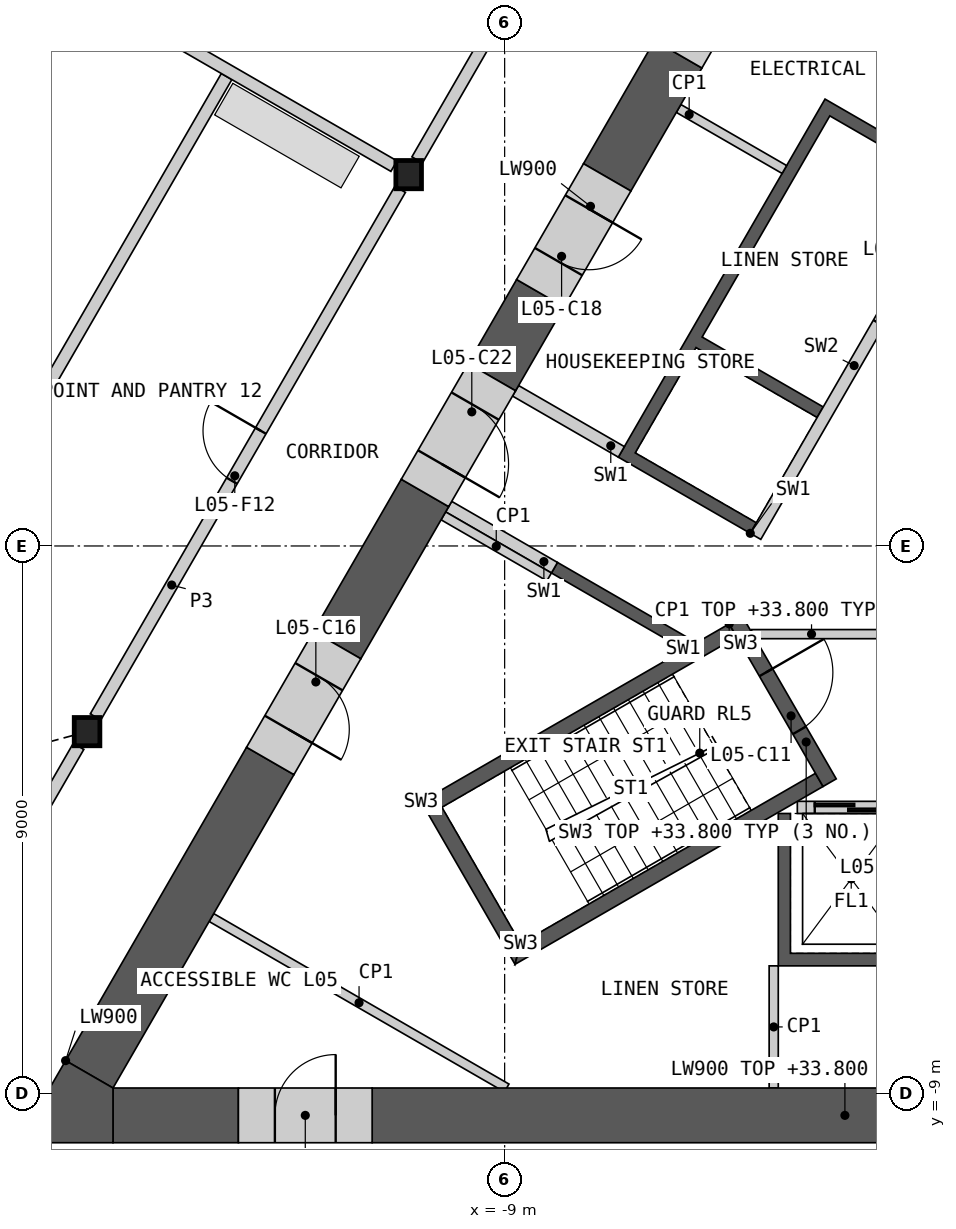
"""IFC4 building model, lengths in metres.
Left out: names, types, materials, properties, quantities, classifications, styles, units other than length and angle.
Written with IfcOpenShell. Run it as: python <this file> out.ifc"""

import sys

from ifc_helpers import new_model, si_unit, direction, frame, frame_2d, origin, origin_2d, place, context, subcontext, project, spatial, polyline, rectangle, i_section, outline, extrude, element, fill, save


model = new_model("IFC4")
c1 = context("Model", 3, precision=1e-05, world=origin(), true_north=direction((0.0, 1.0)))
c2 = subcontext(c1, "Body", "Model", "MODEL_VIEW")
j1 = project(units=[si_unit("LENGTHUNIT", "METRE"), si_unit("PLANEANGLEUNIT", "RADIAN")], contexts=[c1])
p1 = place(None, origin())
s1 = spatial("IfcSite", under=j1, at=p1, CompositionType="ELEMENT")
p2 = place(p1, origin())
s2 = spatial("IfcBuilding", under=s1, at=p2, CompositionType="ELEMENT")
p3 = place(p2, frame((0.0, 0.0, 30.0)))
s3 = spatial("IfcBuildingStorey", under=s2, at=p3, CompositionType="ELEMENT", Elevation=30.0)
for number, where, z_axis, x_axis in (
    (1, (-10.578, 6.107, 0.0), (0.0, 0.0, 1.0), (1.0, 0.0, 0.0)),
    (2, (-15.868, -3.054, 0.0), (0.0, 0.0, 1.0), (1.0, 0.0, 0.0)),
):
    element("IfcColumn", number, at=place(p3, frame(where, z_axis=z_axis, x_axis=x_axis)), inside=s3, PredefinedType="COLUMN", context=c2, shape_type="SweptSolid", body=[
        extrude(i_section(OverallWidth=0.421, OverallDepth=0.465, WebThickness=0.045, FlangeThickness=0.072, at=origin_2d()), origin(), (0.0, 0.0, 1.0), 4.2),
    ])
p4 = place(p3, origin())
e3 = element("IfcWall", 3, at=p4, inside=s3, PredefinedType="SHEAR", context=c2, shape_type="SweptSolid", body=[
    extrude(outline(polyline([(4.5, -4.4), (4.5, -6.906), (-4.5, -6.906), (-4.5, -4.4), (-4.3, -4.4), (-4.3, -6.7), (-2.3, -6.7), (-2.3, -4.4), (-2.1, -4.4), (-2.1, -6.7), (-0.1, -6.7), (-0.1, -4.4), (0.1, -4.4), (0.1, -6.7), (2.1, -6.7), (2.1, -4.4), (2.3, -4.4), (2.3, -6.7), (4.3, -6.7), (4.3, -4.4), (4.5, -4.4)])), origin(), (0.0, 0.0, 1.0), 3.8),
])
p5 = place(p3, frame((-4.187, -4.3, 0.0), z_axis=(0.0, 0.0, 1.0), x_axis=(1.0, 0.0, 0.0)))
e4 = element("IfcWall", 4, at=p5, inside=s3, PredefinedType="SOLIDWALL", context=c2, shape_type="SweptSolid", body=[
    extrude(rectangle(XDim=8.373, YDim=0.2, at=frame_2d((4.187, 0.0))), origin(), (0.0, 0.0, 1.0), 3.8),
])
p6 = place(p5, frame((0.287, 0.0, 0.0)))
e5 = element("IfcOpeningElement", 5, at=p6, cuts=e4, PredefinedType="OPENING", context=c2, shape_type="SweptSolid", body=[
    extrude(rectangle(XDim=1.2, YDim=2.1, at=frame_2d((0.6, 1.05))), frame((0.0, 0.11, 0.0), z_axis=(0.0, -1.0, 0.0), x_axis=(1.0, 0.0, 0.0)), (0.0, 0.0, 1.0), 0.22),
])
p7 = place(p5, frame((2.387, 0.0, 0.0)))
e6 = element("IfcOpeningElement", 6, at=p7, cuts=e4, PredefinedType="OPENING", context=c2, shape_type="SweptSolid", body=[
    extrude(rectangle(XDim=1.4, YDim=2.1, at=frame_2d((0.7, 1.05))), frame((0.0, 0.11, 0.0), z_axis=(0.0, -1.0, 0.0), x_axis=(1.0, 0.0, 0.0)), (0.0, 0.0, 1.0), 0.22),
])
p8 = place(p5, frame((4.737, 0.0, 0.0)))
e7 = element("IfcOpeningElement", 7, at=p8, cuts=e4, PredefinedType="OPENING", context=c2, shape_type="SweptSolid", body=[
    extrude(rectangle(XDim=1.1, YDim=2.1, at=frame_2d((0.55, 1.05))), frame((0.0, 0.11, 0.0), z_axis=(0.0, -1.0, 0.0), x_axis=(1.0, 0.0, 0.0)), (0.0, 0.0, 1.0), 0.22),
])
p9 = place(p5, frame((6.887, 0.0, 0.0)))
e8 = element("IfcOpeningElement", 8, at=p9, cuts=e4, PredefinedType="OPENING", context=c2, shape_type="SweptSolid", body=[
    extrude(rectangle(XDim=1.2, YDim=2.1, at=frame_2d((0.6, 1.05))), frame((0.0, 0.11, 0.0), z_axis=(0.0, -1.0, 0.0), x_axis=(1.0, 0.0, 0.0)), (0.0, 0.0, 1.0), 0.22),
])
p10 = place(p3, origin())
e9 = element("IfcWall", 9, at=p10, inside=s3, PredefinedType="SHEAR", context=c2, shape_type="SweptSolid", body=[
    extrude(outline(polyline([(-6.061, -1.697), (-8.231, -0.444), (-8.131, -0.271), (-5.96, -1.524), (-6.061, -1.697)])), origin(), (0.0, 0.0, 1.0), 3.8),
])
p11 = place(p3, origin())
e10 = element("IfcWall", 10, at=p11, inside=s3, PredefinedType="SHEAR", context=c2, shape_type="SweptSolid", body=[
    extrude(outline(polyline([(-4.96, 0.208), (-7.131, 1.461), (-3.731, 7.35), (-1.561, 6.097), (-1.66, 5.924), (-3.652, 7.074), (-5.752, 3.437), (-3.76, 2.287), (-3.861, 2.113), (-5.852, 3.263), (-6.852, 1.531), (-4.861, 0.381), (-4.96, 0.208)])), origin(), (0.0, 0.0, 1.0), 3.8),
])
p12 = place(p3, frame((-1.631, 5.776, 0.0), z_axis=(0.0, 0.0, 1.0), x_axis=(-0.499992876559, -0.866029516466, 0.0)))
e11 = element("IfcWall", 11, at=p12, inside=s3, PredefinedType="SOLIDWALL", context=c2, shape_type="SweptSolid", body=[
    extrude(rectangle(XDim=6.486, YDim=0.2, at=frame_2d((3.243, 0.0))), origin(), (0.0, 0.0, 1.0), 3.8),
])
p13 = place(p12, frame((1.537, 0.0, 0.0)))
e12 = element("IfcOpeningElement", 12, at=p13, cuts=e11, PredefinedType="OPENING", context=c2, shape_type="SweptSolid", body=[
    extrude(rectangle(XDim=0.9, YDim=2.1, at=frame_2d((0.45, 1.05))), frame((0.0, 0.11, 0.0), z_axis=(0.0, -1.0, 0.0), x_axis=(1.0, 0.0, 0.0)), (0.0, 0.0, 1.0), 0.22),
])
p14 = place(p3, frame((-7.081, 1.548, 0.0), z_axis=(0.0, 0.0, 1.0), x_axis=(-0.865983199114, 0.50007309351, 0.0)))
e13 = element("IfcWall", 13, at=p14, inside=s3, PredefinedType="SHEAR", context=c2, shape_type="SweptSolid", body=[
    extrude(rectangle(XDim=2.009, YDim=0.2, at=frame_2d((1.004, 0.0))), origin(), (0.0, 0.0, 1.0), 3.8),
])
p15 = place(p3, frame((-8.181, -0.357, 0.0), z_axis=(0.0, 0.0, 1.0), x_axis=(-0.866035824272, 0.499981950752, 0.0)))
e14 = element("IfcWall", 14, at=p15, inside=s3, PredefinedType="SHEAR", context=c2, shape_type="SweptSolid", body=[
    extrude(rectangle(XDim=2.009, YDim=0.2, at=frame_2d((1.004, 0.0))), origin(), (0.0, 0.0, 1.0), 3.8),
])
p16 = place(p3, frame((-4.941, -1.45, 0.0), z_axis=(0.0, 0.0, 1.0), x_axis=(1.0, 0.0, 0.0)))
e15 = element("IfcWall", 15, at=p16, inside=s3, PredefinedType="PARTITIONING", context=c2, shape_type="SweptSolid", body=[
    extrude(rectangle(XDim=9.882, YDim=0.15, at=frame_2d((4.941, 0.0))), origin(), (0.0, 0.0, 1.0), 3.8),
])
p17 = place(p16, frame((4.391, 0.0, 0.0)))
e16 = element("IfcOpeningElement", 16, at=p17, cuts=e15, PredefinedType="OPENING", context=c2, shape_type="SweptSolid", body=[
    extrude(rectangle(XDim=1.1, YDim=2.1, at=frame_2d((0.55, 1.05))), frame((0.0, 0.085, 0.0), z_axis=(0.0, -1.0, 0.0), x_axis=(1.0, 0.0, 0.0)), (0.0, 0.0, 1.0), 0.17),
])
p18 = place(p3, origin())
e17 = element("IfcWall", 17, at=p18, inside=s3, PredefinedType="SHEAR", context=c2, shape_type="SweptSolid", body=[
    extrude(outline(polyline([(-5.307, -1.281), (-10.374, -4.206), (-10.032, -4.298), (-5.182, -1.498), (-5.307, -1.281)])), origin(), (0.0, 0.0, 1.0), 3.8),
])
p19 = place(p3, origin())
e18 = element("IfcWall", 18, at=p19, inside=s3, PredefinedType="SHEAR", context=c2, shape_type="SweptSolid", body=[
    extrude(outline(polyline([(-10.374, -4.206), (-8.83, -6.881), (-8.738, -6.539), (-10.032, -4.298), (-10.374, -4.206)])), origin(), (0.0, 0.0, 1.0), 3.8),
])
p20 = place(p3, origin())
e19 = element("IfcWall", 19, at=p20, inside=s3, PredefinedType="SHEAR", context=c2, shape_type="SweptSolid", body=[
    extrude(outline(polyline([(-8.738, -6.539), (-8.83, -6.881), (-3.763, -3.956), (-3.888, -3.739), (-8.738, -6.539)])), origin(), (0.0, 0.0, 1.0), 3.8),
])
p21 = place(p3, frame((-5.199, -1.219, 0.0), z_axis=(0.0, 0.0, 1.0), x_axis=(0.499982516597, -0.866035497597, 0.0)))
e20 = element("IfcWall", 20, at=p21, inside=s3, PredefinedType="SHEAR", context=c2, shape_type="SweptSolid", body=[
    extrude(rectangle(XDim=3.088, YDim=0.25, at=frame_2d((1.544, 0.0))), origin(), (0.0, 0.0, 1.0), 3.8),
])
p22 = place(p21, frame((0.994, 0.0, 0.0)))
e21 = element("IfcOpeningElement", 21, at=p22, cuts=e20, PredefinedType="OPENING", context=c2, shape_type="SweptSolid", body=[
    extrude(rectangle(XDim=1.1, YDim=2.1, at=frame_2d((0.55, 1.05))), frame((0.0, 0.135, 0.0), z_axis=(0.0, -1.0, 0.0), x_axis=(1.0, 0.0, 0.0)), (0.0, 0.0, 1.0), 0.27),
])
p23 = place(p3, frame((-8.268, -0.509, 0.0), z_axis=(0.0, 0.0, 1.0), x_axis=(-0.866035824272, 0.499981950752, 0.0)))
e22 = element("IfcWall", 22, at=p23, inside=s3, PredefinedType="PARTITIONING", context=c2, shape_type="SweptSolid", body=[
    extrude(rectangle(XDim=2.009, YDim=0.15, at=frame_2d((1.004, 0.0))), origin(), (0.0, 0.0, 1.0), 3.8),
])
p24 = place(p3, frame((-4.575, -6.906, 0.0), z_axis=(0.0, 0.0, 1.0), x_axis=(0.0, -1.0, 0.0)))
e23 = element("IfcWall", 23, at=p24, inside=s3, PredefinedType="PARTITIONING", context=c2, shape_type="SweptSolid", body=[
    extrude(rectangle(XDim=2.009, YDim=0.15, at=frame_2d((1.004, 0.0))), origin(), (0.0, 0.0, 1.0), 3.8),
])
p25 = place(p3, frame((-6.139, 7.196, 0.0), z_axis=(0.0, 0.0, 1.0), x_axis=(0.866035824272, -0.499981950752, 0.0)))
e24 = element("IfcWall", 24, at=p25, inside=s3, PredefinedType="PARTITIONING", context=c2, shape_type="SweptSolid", body=[
    extrude(rectangle(XDim=2.009, YDim=0.15, at=frame_2d((1.004, 0.0))), origin(), (0.0, 0.0, 1.0), 3.8),
])
p26 = place(p3, frame((-13.823, -6.111, 0.0), z_axis=(0.0, 0.0, 1.0), x_axis=(0.866026802741, -0.499997576928, 0.0)))
e25 = element("IfcWall", 25, at=p26, inside=s3, PredefinedType="PARTITIONING", context=c2, shape_type="SweptSolid", body=[
    extrude(rectangle(XDim=5.607, YDim=0.15, at=frame_2d((2.804, 0.0))), origin(), (0.0, 0.0, 1.0), 3.8),
])
p27 = place(p3, frame((-11.179, -9.365, 0.0), z_axis=(0.0, 0.0, 1.0), x_axis=(1.0, 0.0, 0.0)))
e26 = element("IfcWall", 26, at=p27, inside=s3, PredefinedType="SHEAR", context=c2, shape_type="SweptSolid", body=[
    extrude(rectangle(XDim=15.55, YDim=0.9, at=frame_2d((7.775, 0.0))), origin(), (0.0, 0.0, 1.0), 3.8),
])
p28 = place(p3, frame((-15.441, -9.365, 0.0), z_axis=(0.0, 0.0, 1.0), x_axis=(1.0, 0.0, 0.0)))
e27 = element("IfcWall", 27, at=p28, inside=s3, PredefinedType="SHEAR", context=c2, shape_type="SweptSolid", body=[
    extrude(rectangle(XDim=2.062, YDim=0.9, at=frame_2d((1.031, 0.0))), origin(), (0.0, 0.0, 1.0), 3.8),
])
p29 = place(p3, frame((-12.855, -3.536, 0.0), z_axis=(0.0, 0.0, 1.0), x_axis=(-0.499999419053, -0.866025739194, 0.0)))
e28 = element("IfcWall", 28, at=p29, inside=s3, PredefinedType="SHEAR", context=c2, shape_type="SweptSolid", body=[
    extrude(rectangle(XDim=5.952, YDim=0.9, at=frame_2d((2.976, 0.0))), origin(), (0.0, 0.0, 1.0), 3.8),
])
p30 = place(p3, frame((-10.31, 0.872, 0.0), z_axis=(0.0, 0.0, 1.0), x_axis=(-0.499946751862, -0.866056144429, 0.0)))
e29 = element("IfcWall", 29, at=p30, inside=s3, PredefinedType="SHEAR", context=c2, shape_type="SweptSolid", body=[
    extrude(rectangle(XDim=2.889, YDim=0.9, at=frame_2d((1.445, 0.0))), origin(), (0.0, 0.0, 1.0), 3.8),
])
p31 = place(p3, frame((-6.145, 8.086, 0.0), z_axis=(0.0, 0.0, 1.0), x_axis=(-0.500026924946, -0.866009858102, 0.0)))
e30 = element("IfcWall", 30, at=p31, inside=s3, PredefinedType="SHEAR", context=c2, shape_type="SweptSolid", body=[
    extrude(rectangle(XDim=2.337, YDim=0.9, at=frame_2d((1.168, 0.0))), origin(), (0.0, 0.0, 1.0), 3.8),
])
p32 = place(p3, frame((-8.413, 4.157, 0.0), z_axis=(0.0, 0.0, 1.0), x_axis=(-0.499961121316, -0.86604784924, 0.0)))
e31 = element("IfcWall", 31, at=p32, inside=s3, PredefinedType="SHEAR", context=c2, shape_type="SweptSolid", body=[
    extrude(rectangle(XDim=1.594, YDim=0.9, at=frame_2d((0.797, 0.0))), origin(), (0.0, 0.0, 1.0), 3.8),
])
p33 = place(p3, origin())
e32 = element("IfcWall", 32, at=p33, inside=s3, PredefinedType="SHEAR", context=c2, shape_type="SweptSolid", body=[
    extrude(outline(polyline([(-16.221, -8.465), (-15.441, -8.915), (-15.441, -9.815), (-17.0, -9.815), (-16.221, -8.465)])), origin(), (0.0, 0.0, 1.0), 3.8),
])
p34 = place(p3, frame((-13.379, -9.365, 0.0), z_axis=(0.0, 0.0, 1.0), x_axis=(1.0, 0.0, 0.0)))
e33 = element("IfcWall", 33, at=p34, inside=s3, PredefinedType="SHEAR", context=c2, shape_type="SweptSolid", body=[
    extrude(rectangle(XDim=2.2, YDim=0.9, at=frame_2d((1.1, 0.0))), origin(), (0.0, 0.0, 1.0), 3.8),
])
p35 = place(p34, frame((0.6, 0.0, 0.0)))
e34 = element("IfcOpeningElement", 34, at=p35, cuts=e33, PredefinedType="OPENING", context=c2, shape_type="SweptSolid", body=[
    extrude(rectangle(XDim=1.0, YDim=2.1, at=frame_2d((0.5, 1.05))), frame((0.0, 0.46, 0.0), z_axis=(0.0, -1.0, 0.0), x_axis=(1.0, 0.0, 0.0)), (0.0, 0.0, 1.0), 0.92),
])
p36 = place(p3, frame((-11.755, -1.63, 0.0), z_axis=(0.0, 0.0, 1.0), x_axis=(-0.50002983664, -0.866008176907, 0.0)))
e35 = element("IfcWall", 35, at=p36, inside=s3, PredefinedType="SHEAR", context=c2, shape_type="SweptSolid", body=[
    extrude(rectangle(XDim=2.2, YDim=0.9, at=frame_2d((1.1, 0.0))), origin(), (0.0, 0.0, 1.0), 3.8),
])
p37 = place(p36, frame((0.6, 0.0, 0.0)))
e36 = element("IfcOpeningElement", 36, at=p37, cuts=e35, PredefinedType="OPENING", context=c2, shape_type="SweptSolid", body=[
    extrude(rectangle(XDim=1.0, YDim=2.1, at=frame_2d((0.5, 1.05))), frame((0.0, 0.46, 0.0), z_axis=(0.0, -1.0, 0.0), x_axis=(1.0, 0.0, 0.0)), (0.0, 0.0, 1.0), 0.92),
])
p38 = place(p3, frame((-7.313, 6.062, 0.0), z_axis=(0.0, 0.0, 1.0), x_axis=(-0.500077893725, -0.86598042715, 0.0)))
e37 = element("IfcWall", 37, at=p38, inside=s3, PredefinedType="SHEAR", context=c2, shape_type="SweptSolid", body=[
    extrude(rectangle(XDim=2.2, YDim=0.9, at=frame_2d((1.1, 0.0))), origin(), (0.0, 0.0, 1.0), 3.8),
])
p39 = place(p38, frame((0.6, 0.0, 0.0)))
e38 = element("IfcOpeningElement", 38, at=p39, cuts=e37, PredefinedType="OPENING", context=c2, shape_type="SweptSolid", body=[
    extrude(rectangle(XDim=1.0, YDim=2.1, at=frame_2d((0.5, 1.05))), frame((0.0, 0.46, 0.0), z_axis=(0.0, -1.0, 0.0), x_axis=(1.0, 0.0, 0.0)), (0.0, 0.0, 1.0), 0.92),
])
p40 = place(p3, frame((-5.045, 9.992, 0.0), z_axis=(0.0, 0.0, 1.0), x_axis=(-0.499898558967, -0.866083962871, 0.0)))
e39 = element("IfcWall", 39, at=p40, inside=s3, PredefinedType="SHEAR", context=c2, shape_type="SweptSolid", body=[
    extrude(rectangle(XDim=2.2, YDim=0.9, at=frame_2d((1.1, 0.0))), origin(), (0.0, 0.0, 1.0), 3.8),
])
p41 = place(p40, frame((0.6, 0.0, 0.0)))
e40 = element("IfcOpeningElement", 40, at=p41, cuts=e39, PredefinedType="OPENING", context=c2, shape_type="SweptSolid", body=[
    extrude(rectangle(XDim=1.0, YDim=2.1, at=frame_2d((0.5, 1.05))), frame((0.0, 0.46, 0.0), z_axis=(0.0, -1.0, 0.0), x_axis=(1.0, 0.0, 0.0)), (0.0, 0.0, 1.0), 0.92),
])
p42 = place(p3, frame((-9.21, 2.777, 0.0), z_axis=(0.0, 0.0, 1.0), x_axis=(-0.500077893725, -0.86598042715, 0.0)))
e41 = element("IfcWall", 41, at=p42, inside=s3, PredefinedType="SHEAR", context=c2, shape_type="SweptSolid", body=[
    extrude(rectangle(XDim=2.2, YDim=0.9, at=frame_2d((1.1, 0.0))), origin(), (0.0, 0.0, 1.0), 3.8),
])
p43 = place(p42, frame((0.55, 0.0, 0.0)))
e42 = element("IfcOpeningElement", 42, at=p43, cuts=e41, PredefinedType="OPENING", context=c2, shape_type="SweptSolid", body=[
    extrude(rectangle(XDim=1.1, YDim=2.1, at=frame_2d((0.55, 1.05))), frame((0.0, 0.46, 0.0), z_axis=(0.0, -1.0, 0.0), x_axis=(1.0, 0.0, 0.0)), (0.0, 0.0, 1.0), 0.92),
])
p44 = place(p3, frame((-10.439, 6.35, 0.0), z_axis=(0.0, 0.0, 1.0), x_axis=(0.50001002959, 0.86601961312, 0.0)))
e43 = element("IfcWall", 43, at=p44, inside=s3, PredefinedType="PARTITIONING", context=c2, shape_type="SweptSolid", body=[
    extrude(rectangle(XDim=10.019, YDim=0.2, at=frame_2d((5.009, 0.0))), origin(), (0.0, 0.0, 1.0), 3.8),
])
p45 = place(p44, frame((4.16, 0.0, 0.0)))
e44 = element("IfcOpeningElement", 44, at=p45, cuts=e43, PredefinedType="OPENING", context=c2, shape_type="SweptSolid", body=[
    extrude(rectangle(XDim=1.8, YDim=2.1, at=frame_2d((0.9, 1.05))), frame((0.0, 0.11, 0.0), z_axis=(0.0, -1.0, 0.0), x_axis=(1.0, 0.0, 0.0)), (0.0, 0.0, 1.0), 0.22),
])
p46 = place(p3, frame((-15.728, -2.811, 0.0), z_axis=(0.0, 0.0, 1.0), x_axis=(0.49999175339, 0.866030164915, 0.0)))
e45 = element("IfcWall", 45, at=p46, inside=s3, PredefinedType="PARTITIONING", context=c2, shape_type="SweptSolid", body=[
    extrude(rectangle(XDim=10.019, YDim=0.2, at=frame_2d((5.009, 0.0))), origin(), (0.0, 0.0, 1.0), 3.8),
])
p47 = place(p46, frame((4.484, 0.0, 0.0)))
e46 = element("IfcOpeningElement", 46, at=p47, cuts=e45, PredefinedType="OPENING", context=c2, shape_type="SweptSolid", body=[
    extrude(rectangle(XDim=0.95, YDim=2.1, at=frame_2d((0.475, 1.05))), frame((0.0, 0.11, 0.0), z_axis=(0.0, -1.0, 0.0), x_axis=(1.0, 0.0, 0.0)), (0.0, 0.0, 1.0), 0.22),
])
p48 = place(p3, frame((-19.244, -8.902, 0.0), z_axis=(0.0, 0.0, 1.0), x_axis=(0.499984737558, 0.86603421538, 0.0)))
e47 = element("IfcWall", 47, at=p48, inside=s3, PredefinedType="PARTITIONING", context=c2, shape_type="SweptSolid", body=[
    extrude(rectangle(XDim=6.473, YDim=0.2, at=frame_2d((3.236, 0.0))), origin(), (0.0, 0.0, 1.0), 3.8),
])
p49 = place(p3, frame((-22.335, -7.455, 0.0), z_axis=(0.0, 0.0, 1.0), x_axis=(0.499997414609, 0.866026896456, 0.0)))
e48 = element("IfcWall", 48, at=p49, inside=s3, PredefinedType="PARTITIONING", context=c2, shape_type="SweptSolid", body=[
    extrude(rectangle(XDim=17.524, YDim=0.2, at=frame_2d((8.762, 0.0))), origin(), (0.0, 0.0, 1.0), 2.885),
])
p50 = place(p49, frame((7.584, 0.0, 0.0)))
e49 = element("IfcOpeningElement", 49, at=p50, cuts=e48, PredefinedType="OPENING", context=c2, shape_type="SweptSolid", body=[
    extrude(rectangle(XDim=0.95, YDim=2.1, at=frame_2d((0.475, 1.05))), frame((0.0, 0.11, 0.0), z_axis=(0.0, -1.0, 0.0), x_axis=(1.0, 0.0, 0.0)), (0.0, 0.0, 1.0), 0.22),
])
p51 = place(p3, frame((-21.947, 12.671, 0.0), z_axis=(0.0, 0.0, 1.0), x_axis=(0.866026729935, -0.499997703033, 0.0)))
e50 = element("IfcWall", 50, at=p51, inside=s3, PredefinedType="PARTITIONING", context=c2, shape_type="SweptSolid", body=[
    extrude(rectangle(XDim=12.848, YDim=0.2, at=frame_2d((6.424, 0.0))), origin(), (0.0, 0.0, 1.0), 2.885),
])
p52 = place(p6, origin())
e51 = element("IfcDoor", 51, at=p52, inside=s3, OperationType="SLIDING_TO_LEFT", PredefinedType="DOOR", context=c2, shape_type="SweptSolid", body=[
    extrude(rectangle(XDim=1.2, YDim=2.1, at=frame_2d((0.6, 1.05))), frame((0.0, 0.025, 0.0), z_axis=(0.0, -1.0, 0.0), x_axis=(1.0, 0.0, 0.0)), (0.0, 0.0, 1.0), 0.05),
])
fill(e5, e51)
p53 = place(p22, origin())
e52 = element("IfcDoor", 52, at=p53, inside=s3, OperationType="SINGLE_SWING_LEFT", PredefinedType="DOOR", context=c2, shape_type="SweptSolid", body=[
    extrude(rectangle(XDim=1.1, YDim=2.1, at=frame_2d((0.55, 1.05))), frame((0.0, 0.025, 0.0), z_axis=(0.0, -1.0, 0.0), x_axis=(1.0, 0.0, 0.0)), (0.0, 0.0, 1.0), 0.05),
])
fill(e21, e52)
p54 = place(p35, origin())
e53 = element("IfcDoor", 53, at=p54, inside=s3, OperationType="SINGLE_SWING_RIGHT", PredefinedType="DOOR", context=c2, shape_type="SweptSolid", body=[
    extrude(rectangle(XDim=1.0, YDim=2.1, at=frame_2d((0.5, 1.05))), frame((0.0, 0.205, 0.0), z_axis=(0.0, -1.0, 0.0), x_axis=(1.0, 0.0, 0.0)), (0.0, 0.0, 1.0), 0.05),
])
fill(e34, e53)
p55 = place(p37, origin())
e54 = element("IfcDoor", 54, at=p55, inside=s3, OperationType="SINGLE_SWING_RIGHT", PredefinedType="DOOR", context=c2, shape_type="SweptSolid", body=[
    extrude(rectangle(XDim=1.0, YDim=2.1, at=frame_2d((0.5, 1.05))), frame((0.0, 0.205, 0.0), z_axis=(0.0, -1.0, 0.0), x_axis=(1.0, 0.0, 0.0)), (0.0, 0.0, 1.0), 0.05),
])
fill(e36, e54)
p56 = place(p39, origin())
e55 = element("IfcDoor", 55, at=p56, inside=s3, OperationType="SINGLE_SWING_LEFT", PredefinedType="DOOR", context=c2, shape_type="SweptSolid", body=[
    extrude(rectangle(XDim=1.0, YDim=2.1, at=frame_2d((0.5, 1.05))), frame((0.0, 0.205, 0.0), z_axis=(0.0, -1.0, 0.0), x_axis=(1.0, 0.0, 0.0)), (0.0, 0.0, 1.0), 0.05),
])
fill(e38, e55)
p57 = place(p43, origin())
e56 = element("IfcDoor", 56, at=p57, inside=s3, OperationType="SINGLE_SWING_RIGHT", PredefinedType="DOOR", context=c2, shape_type="SweptSolid", body=[
    extrude(rectangle(XDim=1.1, YDim=2.1, at=frame_2d((0.55, 1.05))), frame((0.0, 0.205, 0.0), z_axis=(0.0, -1.0, 0.0), x_axis=(1.0, 0.0, 0.0)), (0.0, 0.0, 1.0), 0.05),
])
fill(e42, e56)
p58 = place(p47, origin())
e57 = element("IfcDoor", 57, at=p58, inside=s3, OperationType="SINGLE_SWING_RIGHT", PredefinedType="DOOR", context=c2, shape_type="SweptSolid", body=[
    extrude(rectangle(XDim=0.95, YDim=2.1, at=frame_2d((0.475, 1.05))), frame((0.0, 0.025, 0.0), z_axis=(0.0, -1.0, 0.0), x_axis=(1.0, 0.0, 0.0)), (0.0, 0.0, 1.0), 0.05),
])
fill(e46, e57)
save(model, sys.argv[1])
